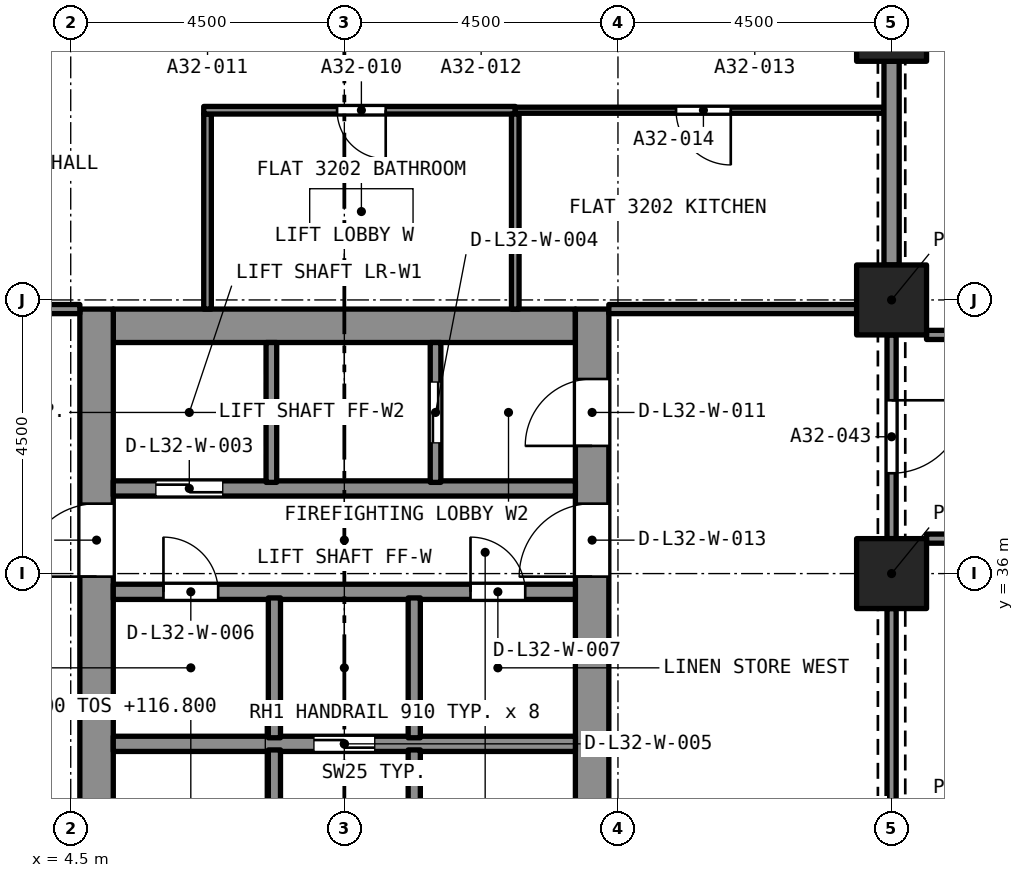
"""IFC4 building model, lengths in metres.
Left out: names, types, materials, properties, quantities, classifications, styles, units other than length and angle.
Written with IfcOpenShell. Run it as: python <this file> out.ifc"""

import sys

from ifc_helpers import new_model, si_unit, direction, frame, frame_2d, origin, origin_2d, place, context, subcontext, project, spatial, rectangle, extrude, element, fill, save


model = new_model("IFC4")
c1 = context("Model", 3, precision=1e-05, world=origin(), true_north=direction((0.0, 1.0)))
c2 = subcontext(c1, "Body", "Model", "MODEL_VIEW")
j1 = project(units=[si_unit("LENGTHUNIT", "METRE"), si_unit("PLANEANGLEUNIT", "RADIAN")], contexts=[c1])
p1 = place(None, origin())
s1 = spatial("IfcSite", under=j1, at=p1, CompositionType="ELEMENT")
p2 = place(p1, origin())
s2 = spatial("IfcBuilding", under=s1, at=p2, CompositionType="ELEMENT")
p3 = place(p2, frame((0.0, 0.0, 115.2)))
s3 = spatial("IfcBuildingStorey", under=s2, at=p3, CompositionType="ELEMENT", Elevation=115.2)
for number, where, z_axis, x_axis in (
    (1, (18.0, 36.0, 0.0), (0.0, 0.0, 1.0), (1.0, 0.0, 0.0)),
    (2, (18.0, 40.5, 0.0), (0.0, 0.0, 1.0), (1.0, 0.0, 0.0)),
    (3, (18.0, 45.0, 0.0), (0.0, 0.0, 1.0), (1.0, 0.0, 0.0)),
):
    element("IfcColumn", number, at=place(p3, frame(where, z_axis=z_axis, x_axis=x_axis)), inside=s3, PredefinedType="COLUMN", context=c2, shape_type="SweptSolid", body=[
        extrude(rectangle(XDim=1.15, YDim=1.15, at=origin_2d()), origin(), (0.0, 0.0, 1.0), 3.2),
    ])
p4 = place(p3, frame((5.2, 40.075, 0.0), z_axis=(0.0, 0.0, 1.0), x_axis=(1.0, 0.0, 0.0)))
e4 = element("IfcWall", 4, at=p4, inside=s3, PredefinedType="SOLIDWALL", context=c2, shape_type="SweptSolid", body=[
    extrude(rectangle(XDim=7.6, YDim=0.55, at=frame_2d((3.8, 0.0))), origin(), (0.0, 0.0, 1.0), 3.2),
])
p5 = place(p3, frame((4.925, 27.15, 0.0), z_axis=(0.0, 0.0, 1.0), x_axis=(0.0, 1.0, 0.0)))
e5 = element("IfcWall", 5, at=p5, inside=s3, PredefinedType="SOLIDWALL", context=c2, shape_type="SweptSolid", body=[
    extrude(rectangle(XDim=13.2, YDim=0.55, at=frame_2d((6.6, 0.0))), origin(), (0.0, 0.0, 1.0), 3.2),
])
p6 = place(p5, frame((8.8, 0.0, 0.0)))
e6 = element("IfcOpeningElement", 6, at=p6, cuts=e5, PredefinedType="OPENING", context=c2, shape_type="SweptSolid", body=[
    extrude(rectangle(XDim=1.2, YDim=2.1, at=frame_2d((0.6, 1.05))), frame((0.0, 0.285, 0.0), z_axis=(0.0, -1.0, 0.0), x_axis=(1.0, 0.0, 0.0)), (0.0, 0.0, 1.0), 0.57),
])
p7 = place(p3, frame((13.075, 27.15, 0.0), z_axis=(0.0, 0.0, 1.0), x_axis=(0.0, 1.0, 0.0)))
e7 = element("IfcWall", 7, at=p7, inside=s3, PredefinedType="SOLIDWALL", context=c2, shape_type="SweptSolid", body=[
    extrude(rectangle(XDim=13.2, YDim=0.55, at=frame_2d((6.6, 0.0))), origin(), (0.0, 0.0, 1.0), 3.2),
])
p8 = place(p7, frame((10.95, 0.0, 0.0)))
e8 = element("IfcOpeningElement", 8, at=p8, cuts=e7, PredefinedType="OPENING", context=c2, shape_type="SweptSolid", body=[
    extrude(rectangle(XDim=1.1, YDim=2.1, at=frame_2d((0.55, 1.05))), frame((0.0, 0.285, 0.0), z_axis=(0.0, -1.0, 0.0), x_axis=(1.0, 0.0, 0.0)), (0.0, 0.0, 1.0), 0.57),
])
p9 = place(p7, frame((8.8, 0.0, 0.0)))
e9 = element("IfcOpeningElement", 9, at=p9, cuts=e7, PredefinedType="OPENING", context=c2, shape_type="SweptSolid", body=[
    extrude(rectangle(XDim=1.2, YDim=2.1, at=frame_2d((0.6, 1.05))), frame((0.0, 0.285, 0.0), z_axis=(0.0, -1.0, 0.0), x_axis=(1.0, 0.0, 0.0)), (0.0, 0.0, 1.0), 0.57),
])
p10 = place(p3, frame((6.75, 40.35, 0.0), z_axis=(0.0, 0.0, 1.0), x_axis=(0.0, 1.0, 0.0)))
e10 = element("IfcWall", 10, at=p10, inside=s3, PredefinedType="PARTITIONING", context=c2, shape_type="SweptSolid", body=[
    extrude(rectangle(XDim=3.208, YDim=0.125, at=frame_2d((1.604, 0.0))), origin(), (0.0, 0.0, 1.0), 2.9),
])
p11 = place(p3, frame((11.811, 43.62, 0.0), z_axis=(0.0, 0.0, 1.0), x_axis=(-1.0, 0.0, 0.0)))
e11 = element("IfcWall", 11, at=p11, inside=s3, PredefinedType="PARTITIONING", context=c2, shape_type="SweptSolid", body=[
    extrude(rectangle(XDim=5.123, YDim=0.125, at=frame_2d((2.562, 0.0))), origin(), (0.0, 0.0, 1.0), 2.9),
])
p12 = place(p11, frame((2.13, 0.0, 0.0)))
e12 = element("IfcOpeningElement", 12, at=p12, cuts=e11, PredefinedType="OPENING", context=c2, shape_type="SweptSolid", body=[
    extrude(rectangle(XDim=0.8, YDim=2.1, at=frame_2d((0.4, 1.05))), frame((0.0, 0.073, 0.0), z_axis=(0.0, -1.0, 0.0), x_axis=(1.0, 0.0, 0.0)), (0.0, 0.0, 1.0), 0.145),
])
p13 = place(p3, frame((11.811, 40.35, 0.0), z_axis=(0.0, 0.0, 1.0), x_axis=(0.0, 1.0, 0.0)))
e13 = element("IfcWall", 13, at=p13, inside=s3, PredefinedType="PARTITIONING", context=c2, shape_type="SweptSolid", body=[
    extrude(rectangle(XDim=3.208, YDim=0.125, at=frame_2d((1.604, 0.0))), origin(), (0.0, 0.0, 1.0), 2.9),
])
p14 = place(p3, frame((17.875, 43.62, 0.0), z_axis=(0.0, 0.0, 1.0), x_axis=(-1.0, 0.0, 0.0)))
e14 = element("IfcWall", 14, at=p14, inside=s3, PredefinedType="PARTITIONING", context=c2, shape_type="SweptSolid", body=[
    extrude(rectangle(XDim=6.064, YDim=0.1, at=frame_2d((3.032, 0.0))), origin(), (0.0, 0.0, 1.0), 2.9),
])
p15 = place(p14, frame((2.52, 0.0, 0.0)))
e15 = element("IfcOpeningElement", 15, at=p15, cuts=e14, PredefinedType="OPENING", context=c2, shape_type="SweptSolid", body=[
    extrude(rectangle(XDim=0.9, YDim=2.1, at=frame_2d((0.45, 1.05))), frame((0.0, 0.06, 0.0), z_axis=(0.0, -1.0, 0.0), x_axis=(1.0, 0.0, 0.0)), (0.0, 0.0, 1.0), 0.12),
])
p16 = place(p3, frame((0.575, 40.35, 0.0), z_axis=(0.0, 0.0, 1.0), x_axis=(1.0, 0.0, 0.0)))
e16 = element("IfcWall", 16, at=p16, inside=s3, PredefinedType="PARTITIONING", context=c2, shape_type="SweptSolid", body=[
    extrude(rectangle(XDim=4.075, YDim=0.15, at=frame_2d((2.038, 0.0))), origin(), (0.0, 0.0, 1.0), 2.9),
])
p17 = place(p16, frame((1.175, 0.0, 0.0)))
e17 = element("IfcOpeningElement", 17, at=p17, cuts=e16, PredefinedType="OPENING", context=c2, shape_type="SweptSolid", body=[
    extrude(rectangle(XDim=1.0, YDim=2.1, at=frame_2d((0.5, 1.05))), frame((0.0, 0.085, 0.0), z_axis=(0.0, -1.0, 0.0), x_axis=(1.0, 0.0, 0.0)), (0.0, 0.0, 1.0), 0.17),
])
p18 = place(p3, frame((18.0, 41.075, 0.0), z_axis=(0.0, 0.0, 1.0), x_axis=(0.0, 1.0, 0.0)))
e18 = element("IfcWall", 18, at=p18, inside=s3, PredefinedType="PARTITIONING", context=c2, shape_type="SweptSolid", body=[
    extrude(rectangle(XDim=3.35, YDim=0.25, at=frame_2d((1.675, 0.0))), origin(), (0.0, 0.0, 1.0), 2.38),
])
p19 = place(p3, frame((13.35, 40.35, 0.0), z_axis=(0.0, 0.0, 1.0), x_axis=(1.0, 0.0, 0.0)))
e19 = element("IfcWall", 19, at=p19, inside=s3, PredefinedType="PARTITIONING", context=c2, shape_type="SweptSolid", body=[
    extrude(rectangle(XDim=4.075, YDim=0.15, at=frame_2d((2.038, 0.0))), origin(), (0.0, 0.0, 1.0), 2.9),
])
p20 = place(p3, frame((18.575, 39.925, 0.0), z_axis=(0.0, 0.0, 1.0), x_axis=(1.0, 0.0, 0.0)))
e20 = element("IfcWall", 20, at=p20, inside=s3, PredefinedType="PARTITIONING", context=c2, shape_type="SweptSolid", body=[
    extrude(rectangle(XDim=8.425, YDim=0.15, at=frame_2d((4.212, 0.0))), origin(), (0.0, 0.0, 1.0), 2.75),
])
p21 = place(p20, frame((3.425, 0.0, 0.0)))
e21 = element("IfcOpeningElement", 21, at=p21, cuts=e20, PredefinedType="OPENING", context=c2, shape_type="SweptSolid", body=[
    extrude(rectangle(XDim=1.0, YDim=2.1, at=frame_2d((0.5, 1.05))), frame((0.0, 0.085, 0.0), z_axis=(0.0, -1.0, 0.0), x_axis=(1.0, 0.0, 0.0)), (0.0, 0.0, 1.0), 0.17),
])
p22 = place(p3, frame((30.925, 36.575, 0.0), z_axis=(0.0, 0.0, 1.0), x_axis=(-1.0, 0.0, 0.0)))
e22 = element("IfcWall", 22, at=p22, inside=s3, PredefinedType="PARTITIONING", context=c2, shape_type="SweptSolid", body=[
    extrude(rectangle(XDim=12.35, YDim=0.15, at=frame_2d((6.175, 0.0))), origin(), (0.0, 0.0, 1.0), 2.75),
])
p23 = place(p22, frame((5.675, 0.0, 0.0)))
e23 = element("IfcOpeningElement", 23, at=p23, cuts=e22, PredefinedType="OPENING", context=c2, shape_type="SweptSolid", body=[
    extrude(rectangle(XDim=1.0, YDim=2.1, at=frame_2d((0.5, 1.05))), frame((0.0, 0.085, 0.0), z_axis=(0.0, -1.0, 0.0), x_axis=(1.0, 0.0, 0.0)), (0.0, 0.0, 1.0), 0.17),
])
p24 = place(p3, frame((18.0, 39.925, 0.0), z_axis=(0.0, 0.0, 1.0), x_axis=(0.0, -1.0, 0.0)))
e24 = element("IfcWall", 24, at=p24, inside=s3, PredefinedType="PARTITIONING", context=c2, shape_type="SweptSolid", body=[
    extrude(rectangle(XDim=3.35, YDim=0.15, at=frame_2d((1.675, 0.0))), origin(), (0.0, 0.0, 1.0), 2.38),
])
p25 = place(p24, frame((1.075, 0.0, 0.0)))
e25 = element("IfcOpeningElement", 25, at=p25, cuts=e24, PredefinedType="OPENING", context=c2, shape_type="SweptSolid", body=[
    extrude(rectangle(XDim=1.2, YDim=2.1, at=frame_2d((0.6, 1.05))), frame((0.0, 0.085, 0.0), z_axis=(0.0, -1.0, 0.0), x_axis=(1.0, 0.0, 0.0)), (0.0, 0.0, 1.0), 0.17),
])
p26 = place(p3, frame((18.0, 32.075, 0.0), z_axis=(0.0, 0.0, 1.0), x_axis=(0.0, 1.0, 0.0)))
e26 = element("IfcWall", 26, at=p26, inside=s3, PredefinedType="PARTITIONING", context=c2, shape_type="SweptSolid", body=[
    extrude(rectangle(XDim=3.35, YDim=0.15, at=frame_2d((1.675, 0.0))), origin(), (0.0, 0.0, 1.0), 2.38),
])
p27 = place(p3, frame((5.2, 33.2, 0.0), z_axis=(0.0, 0.0, 1.0), x_axis=(1.0, 0.0, 0.0)))
e27 = element("IfcWall", 27, at=p27, inside=s3, PredefinedType="SOLIDWALL", context=c2, shape_type="SweptSolid", body=[
    extrude(rectangle(XDim=7.6, YDim=0.25, at=frame_2d((3.8, 0.0))), origin(), (0.0, 0.0, 1.0), 2.9),
])
p28 = place(p27, frame((3.3, 0.0, 0.0)))
e28 = element("IfcOpeningElement", 28, at=p28, cuts=e27, PredefinedType="OPENING", context=c2, shape_type="SweptSolid", body=[
    extrude(rectangle(XDim=1.0, YDim=2.1, at=frame_2d((0.5, 1.05))), frame((0.0, 0.135, 0.0), z_axis=(0.0, -1.0, 0.0), x_axis=(1.0, 0.0, 0.0)), (0.0, 0.0, 1.0), 0.27),
])
p29 = place(p3, frame((5.2, 35.7, 0.0), z_axis=(0.0, 0.0, 1.0), x_axis=(1.0, 0.0, 0.0)))
e29 = element("IfcWall", 29, at=p29, inside=s3, PredefinedType="SOLIDWALL", context=c2, shape_type="SweptSolid", body=[
    extrude(rectangle(XDim=7.6, YDim=0.25, at=frame_2d((3.8, 0.0))), origin(), (0.0, 0.0, 1.0), 2.9),
])
p30 = place(p29, frame((0.825, 0.0, 0.0)))
e30 = element("IfcOpeningElement", 30, at=p30, cuts=e29, PredefinedType="OPENING", context=c2, shape_type="SweptSolid", body=[
    extrude(rectangle(XDim=0.9, YDim=2.1, at=frame_2d((0.45, 1.05))), frame((0.0, 0.135, 0.0), z_axis=(0.0, -1.0, 0.0), x_axis=(1.0, 0.0, 0.0)), (0.0, 0.0, 1.0), 0.27),
])
p31 = place(p29, frame((5.875, 0.0, 0.0)))
e31 = element("IfcOpeningElement", 31, at=p31, cuts=e29, PredefinedType="OPENING", context=c2, shape_type="SweptSolid", body=[
    extrude(rectangle(XDim=0.9, YDim=2.1, at=frame_2d((0.45, 1.05))), frame((0.0, 0.135, 0.0), z_axis=(0.0, -1.0, 0.0), x_axis=(1.0, 0.0, 0.0)), (0.0, 0.0, 1.0), 0.27),
])
p32 = place(p3, frame((5.2, 37.4, 0.0), z_axis=(0.0, 0.0, 1.0), x_axis=(1.0, 0.0, 0.0)))
e32 = element("IfcWall", 32, at=p32, inside=s3, PredefinedType="SOLIDWALL", context=c2, shape_type="SweptSolid", body=[
    extrude(rectangle(XDim=7.6, YDim=0.25, at=frame_2d((3.8, 0.0))), origin(), (0.0, 0.0, 1.0), 2.9),
])
p33 = place(p32, frame((0.7, 0.0, 0.0)))
e33 = element("IfcOpeningElement", 33, at=p33, cuts=e32, PredefinedType="OPENING", context=c2, shape_type="SweptSolid", body=[
    extrude(rectangle(XDim=1.1, YDim=2.4, at=frame_2d((0.55, 1.2))), frame((0.0, 0.135, 0.0), z_axis=(0.0, -1.0, 0.0), x_axis=(1.0, 0.0, 0.0)), (0.0, 0.0, 1.0), 0.27),
])
p34 = place(p3, frame((7.85, 27.7, 0.0), z_axis=(0.0, 0.0, 1.0), x_axis=(0.0, 1.0, 0.0)))
e34 = element("IfcWall", 34, at=p34, inside=s3, PredefinedType="SOLIDWALL", context=c2, shape_type="SweptSolid", body=[
    extrude(rectangle(XDim=5.4, YDim=0.2, at=frame_2d((2.7, 0.0))), origin(), (0.0, 0.0, 1.0), 2.9),
])
p35 = place(p34, frame((0.2, 0.0, 0.0)))
e35 = element("IfcOpeningElement", 35, at=p35, cuts=e34, PredefinedType="OPENING", context=c2, shape_type="SweptSolid", body=[
    extrude(rectangle(XDim=0.9, YDim=2.1, at=frame_2d((0.45, 1.05))), frame((0.0, 0.11, 0.0), z_axis=(0.0, -1.0, 0.0), x_axis=(1.0, 0.0, 0.0)), (0.0, 0.0, 1.0), 0.22),
])
p36 = place(p3, frame((10.15, 27.7, 0.0), z_axis=(0.0, 0.0, 1.0), x_axis=(0.0, 1.0, 0.0)))
e36 = element("IfcWall", 36, at=p36, inside=s3, PredefinedType="SOLIDWALL", context=c2, shape_type="SweptSolid", body=[
    extrude(rectangle(XDim=5.4, YDim=0.2, at=frame_2d((2.7, 0.0))), origin(), (0.0, 0.0, 1.0), 2.9),
])
p37 = place(p36, frame((0.2, 0.0, 0.0)))
e37 = element("IfcOpeningElement", 37, at=p37, cuts=e36, PredefinedType="OPENING", context=c2, shape_type="SweptSolid", body=[
    extrude(rectangle(XDim=0.9, YDim=2.1, at=frame_2d((0.45, 1.05))), frame((0.0, 0.11, 0.0), z_axis=(0.0, -1.0, 0.0), x_axis=(1.0, 0.0, 0.0)), (0.0, 0.0, 1.0), 0.22),
])
for number, where, z_axis, x_axis in (
    (38, (7.85, 33.3, 0.0), (0.0, 0.0, 1.0), (0.0, 1.0, 0.0)),
    (39, (10.15, 33.3, 0.0), (0.0, 0.0, 1.0), (0.0, 1.0, 0.0)),
):
    element("IfcWall", number, at=place(p3, frame(where, z_axis=z_axis, x_axis=x_axis)), inside=s3, PredefinedType="SOLIDWALL", context=c2, shape_type="SweptSolid", body=[
        extrude(rectangle(XDim=2.3, YDim=0.2, at=frame_2d((1.15, 0.0))), origin(), (0.0, 0.0, 1.0), 2.9),
    ])
p38 = place(p3, frame((7.8, 37.5, 0.0), z_axis=(0.0, 0.0, 1.0), x_axis=(0.0, 1.0, 0.0)))
e40 = element("IfcWall", 40, at=p38, inside=s3, PredefinedType="SOLIDWALL", context=c2, shape_type="SweptSolid", body=[
    extrude(rectangle(XDim=2.3, YDim=0.175, at=frame_2d((1.15, 0.0))), origin(), (0.0, 0.0, 1.0), 2.9),
])
p39 = place(p3, frame((10.5, 37.5, 0.0), z_axis=(0.0, 0.0, 1.0), x_axis=(0.0, 1.0, 0.0)))
e41 = element("IfcWall", 41, at=p39, inside=s3, PredefinedType="SOLIDWALL", context=c2, shape_type="SweptSolid", body=[
    extrude(rectangle(XDim=2.3, YDim=0.175, at=frame_2d((1.15, 0.0))), origin(), (0.0, 0.0, 1.0), 2.9),
])
p40 = place(p39, frame((0.65, 0.0, 0.0)))
e42 = element("IfcOpeningElement", 42, at=p40, cuts=e41, PredefinedType="OPENING", context=c2, shape_type="SweptSolid", body=[
    extrude(rectangle(XDim=1.0, YDim=2.1, at=frame_2d((0.5, 1.05))), frame((0.0, 0.097, 0.0), z_axis=(0.0, -1.0, 0.0), x_axis=(1.0, 0.0, 0.0)), (0.0, 0.0, 1.0), 0.195),
])
p41 = place(p12, origin())
e43 = element("IfcDoor", 43, at=p41, inside=s3, OperationType="SINGLE_SWING_LEFT", PredefinedType="DOOR", context=c2, shape_type="SweptSolid", body=[
    extrude(rectangle(XDim=0.8, YDim=2.1, at=frame_2d((0.4, 1.05))), frame((0.0, 0.025, 0.0), z_axis=(0.0, -1.0, 0.0), x_axis=(1.0, 0.0, 0.0)), (0.0, 0.0, 1.0), 0.05),
])
fill(e12, e43)
p42 = place(p15, origin())
e44 = element("IfcDoor", 44, at=p42, inside=s3, OperationType="SINGLE_SWING_LEFT", PredefinedType="DOOR", context=c2, shape_type="SweptSolid", body=[
    extrude(rectangle(XDim=0.9, YDim=2.1, at=frame_2d((0.45, 1.05))), frame((0.0, 0.025, 0.0), z_axis=(0.0, -1.0, 0.0), x_axis=(1.0, 0.0, 0.0)), (0.0, 0.0, 1.0), 0.05),
])
fill(e15, e44)
p43 = place(p25, origin())
e45 = element("IfcDoor", 45, at=p43, inside=s3, OperationType="SINGLE_SWING_LEFT", PredefinedType="DOOR", context=c2, shape_type="SweptSolid", body=[
    extrude(rectangle(XDim=1.2, YDim=2.1, at=frame_2d((0.6, 1.05))), frame((0.0, 0.025, 0.0), z_axis=(0.0, -1.0, 0.0), x_axis=(1.0, 0.0, 0.0)), (0.0, 0.0, 1.0), 0.05),
])
fill(e25, e45)
p44 = place(p33, origin())
e46 = element("IfcDoor", 46, at=p44, inside=s3, OperationType="SLIDING_TO_LEFT", PredefinedType="DOOR", context=c2, shape_type="SweptSolid", body=[
    extrude(rectangle(XDim=1.1, YDim=2.4, at=frame_2d((0.55, 1.2))), frame((0.0, 0.025, 0.0), z_axis=(0.0, -1.0, 0.0), x_axis=(1.0, 0.0, 0.0)), (0.0, 0.0, 1.0), 0.05),
])
fill(e33, e46)
p45 = place(p40, origin())
e47 = element("IfcDoor", 47, at=p45, inside=s3, OperationType="SLIDING_TO_LEFT", PredefinedType="DOOR", context=c2, shape_type="SweptSolid", body=[
    extrude(rectangle(XDim=1.0, YDim=2.1, at=frame_2d((0.5, 1.05))), frame((0.0, 0.025, 0.0), z_axis=(0.0, -1.0, 0.0), x_axis=(1.0, 0.0, 0.0)), (0.0, 0.0, 1.0), 0.05),
])
fill(e42, e47)
p46 = place(p28, origin())
e48 = element("IfcDoor", 48, at=p46, inside=s3, OperationType="SLIDING_TO_LEFT", PredefinedType="DOOR", context=c2, shape_type="SweptSolid", body=[
    extrude(rectangle(XDim=1.0, YDim=2.1, at=frame_2d((0.5, 1.05))), frame((0.0, 0.025, 0.0), z_axis=(0.0, -1.0, 0.0), x_axis=(1.0, 0.0, 0.0)), (0.0, 0.0, 1.0), 0.05),
])
fill(e28, e48)
p47 = place(p30, origin())
e49 = element("IfcDoor", 49, at=p47, inside=s3, OperationType="SINGLE_SWING_LEFT", PredefinedType="DOOR", context=c2, shape_type="SweptSolid", body=[
    extrude(rectangle(XDim=0.9, YDim=2.1, at=frame_2d((0.45, 1.05))), frame((0.0, 0.025, 0.0), z_axis=(0.0, -1.0, 0.0), x_axis=(1.0, 0.0, 0.0)), (0.0, 0.0, 1.0), 0.05),
])
fill(e30, e49)
p48 = place(p31, origin())
e50 = element("IfcDoor", 50, at=p48, inside=s3, OperationType="SINGLE_SWING_LEFT", PredefinedType="DOOR", context=c2, shape_type="SweptSolid", body=[
    extrude(rectangle(XDim=0.9, YDim=2.1, at=frame_2d((0.45, 1.05))), frame((0.0, 0.025, 0.0), z_axis=(0.0, -1.0, 0.0), x_axis=(1.0, 0.0, 0.0)), (0.0, 0.0, 1.0), 0.05),
])
fill(e31, e50)
p49 = place(p8, origin())
e51 = element("IfcDoor", 51, at=p49, inside=s3, OperationType="SINGLE_SWING_LEFT", PredefinedType="DOOR", context=c2, shape_type="SweptSolid", body=[
    extrude(rectangle(XDim=1.1, YDim=2.1, at=frame_2d((0.55, 1.05))), frame((0.0, 0.025, 0.0), z_axis=(0.0, -1.0, 0.0), x_axis=(1.0, 0.0, 0.0)), (0.0, 0.0, 1.0), 0.05),
])
fill(e8, e51)
p50 = place(p6, origin())
e52 = element("IfcDoor", 52, at=p50, inside=s3, OperationType="SINGLE_SWING_LEFT", PredefinedType="DOOR", context=c2, shape_type="SweptSolid", body=[
    extrude(rectangle(XDim=1.2, YDim=2.1, at=frame_2d((0.6, 1.05))), frame((0.0, 0.025, 0.0), z_axis=(0.0, -1.0, 0.0), x_axis=(1.0, 0.0, 0.0)), (0.0, 0.0, 1.0), 0.05),
])
fill(e6, e52)
p51 = place(p9, origin())
e53 = element("IfcDoor", 53, at=p51, inside=s3, OperationType="SINGLE_SWING_LEFT", PredefinedType="DOOR", context=c2, shape_type="SweptSolid", body=[
    extrude(rectangle(XDim=1.2, YDim=2.1, at=frame_2d((0.6, 1.05))), frame((0.0, 0.025, 0.0), z_axis=(0.0, -1.0, 0.0), x_axis=(1.0, 0.0, 0.0)), (0.0, 0.0, 1.0), 0.05),
])
fill(e9, e53)
save(model, sys.argv[1])
